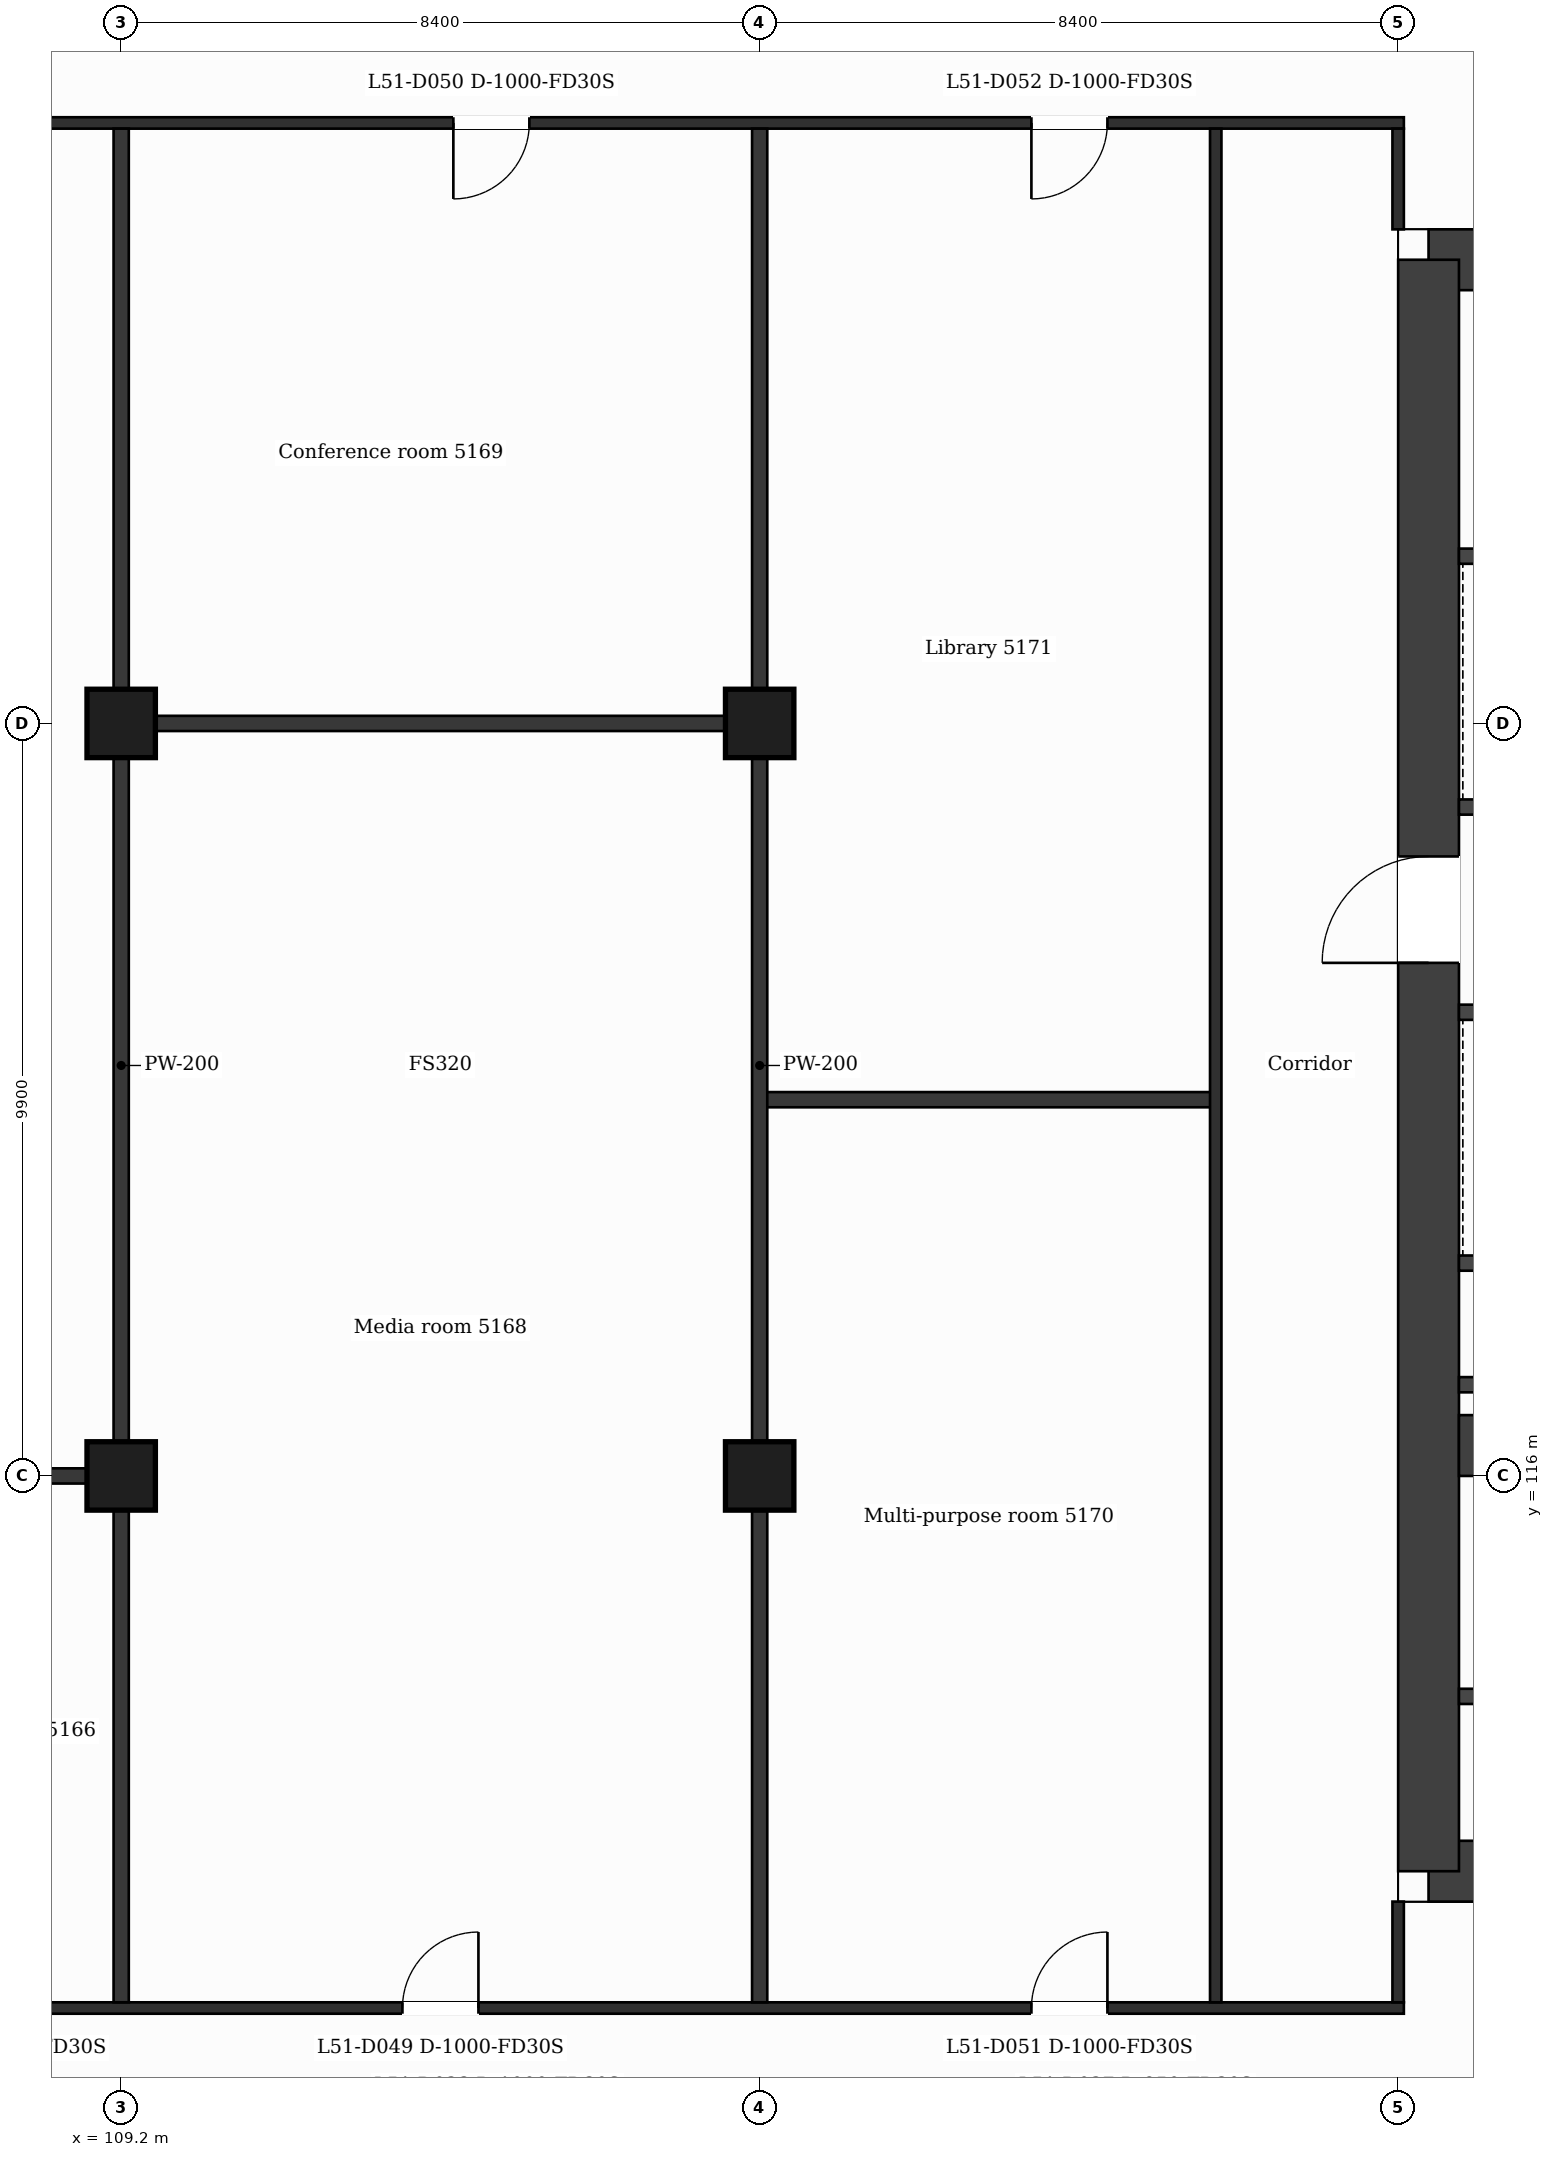
"""IFC4 building model, lengths in metres.
Left out: names, types, materials, properties, quantities, classifications, styles, units other than length and angle.
Written with IfcOpenShell. Run it as: python <this file> out.ifc"""

import sys

from ifc_helpers import new_model, si_unit, direction, frame, frame_2d, origin, origin_2d, place, context, subcontext, project, spatial, rectangle, extrude, element, fill, save


model = new_model("IFC4")
c1 = context("Model", 3, precision=1e-05, world=origin(), true_north=direction((0.0, 1.0)))
c2 = subcontext(c1, "Body", "Model", "MODEL_VIEW")
j1 = project(units=[si_unit("LENGTHUNIT", "METRE"), si_unit("PLANEANGLEUNIT", "RADIAN")], contexts=[c1])
p1 = place(None, origin())
s1 = spatial("IfcSite", under=j1, at=p1, CompositionType="ELEMENT")
p2 = place(p1, origin())
s2 = spatial("IfcBuilding", under=s1, at=p2, CompositionType="ELEMENT")
p3 = place(p2, frame((0.0, 0.0, 213.3)))
s3 = spatial("IfcBuildingStorey", under=s2, at=p3, CompositionType="ELEMENT", Elevation=213.3)
p4 = place(p3, frame((126.4, 132.0, 0.0), z_axis=(0.0, 0.0, 1.0), x_axis=(1.0, 0.0, 0.0)))
e1 = element("IfcWall", 1, at=p4, inside=s3, PredefinedType="SHEAR", context=c2, shape_type="SweptSolid", body=[
    extrude(rectangle(XDim=11.42, YDim=0.8, at=frame_2d((5.71, 0.0))), origin(), (0.0, 0.0, 1.0), 3.7),
])
p5 = place(p4, frame((3.386, 0.0, 0.0)))
e2 = element("IfcOpeningElement", 2, at=p5, cuts=e1, PredefinedType="OPENING", context=c2, shape_type="SweptSolid", body=[
    extrude(rectangle(XDim=1.2, YDim=2.1, at=frame_2d((0.6, 1.05))), frame((0.0, 0.41, 0.0), z_axis=(0.0, -1.0, 0.0), x_axis=(1.0, 0.0, 0.0)), (0.0, 0.0, 1.0), 0.82),
])
p6 = place(p3, frame((140.673, 110.8, 0.0), z_axis=(0.0, 0.0, 1.0), x_axis=(-1.0, 0.0, 0.0)))
e3 = element("IfcWall", 3, at=p6, inside=s3, PredefinedType="SHEAR", context=c2, shape_type="SweptSolid", body=[
    extrude(rectangle(XDim=14.273, YDim=0.8, at=frame_2d((7.137, 0.0))), origin(), (0.0, 0.0, 1.0), 3.7),
])
p7 = place(p6, frame((6.965, 0.0, 0.0)))
e4 = element("IfcOpeningElement", 4, at=p7, cuts=e3, PredefinedType="OPENING", context=c2, shape_type="SweptSolid", body=[
    extrude(rectangle(XDim=1.4, YDim=2.1, at=frame_2d((0.7, 1.05))), frame((0.0, 0.41, 0.0), z_axis=(0.0, -1.0, 0.0), x_axis=(1.0, 0.0, 0.0)), (0.0, 0.0, 1.0), 0.82),
])
p8 = place(p3, frame((126.4, 110.8, 0.0), z_axis=(0.0, 0.0, 1.0), x_axis=(0.0, 1.0, 0.0)))
e5 = element("IfcWall", 5, at=p8, inside=s3, PredefinedType="SHEAR", context=c2, shape_type="SweptSolid", body=[
    extrude(rectangle(XDim=21.2, YDim=0.8, at=frame_2d((10.6, 0.0))), origin(), (0.0, 0.0, 1.0), 3.7),
])
p9 = place(p8, frame((11.95, 0.0, 0.0)))
e6 = element("IfcOpeningElement", 6, at=p9, cuts=e5, PredefinedType="OPENING", context=c2, shape_type="SweptSolid", body=[
    extrude(rectangle(XDim=1.4, YDim=2.1, at=frame_2d((0.7, 1.05))), frame((0.0, 0.41, 0.0), z_axis=(0.0, -1.0, 0.0), x_axis=(1.0, 0.0, 0.0)), (0.0, 0.0, 1.0), 0.82),
])
p10 = place(p3, frame((126.8, 116.4, 0.0), z_axis=(0.0, 0.0, 1.0), x_axis=(1.0, 0.0, 0.0)))
e7 = element("IfcWall", 7, at=p10, inside=s3, PredefinedType="SHEAR", context=c2, shape_type="SweptSolid", body=[
    extrude(rectangle(XDim=5.3, YDim=0.8, at=frame_2d((2.65, 0.0))), origin(), (0.0, 0.0, 1.0), 3.7),
])
for number, where, z_axis, x_axis in (
    (8, (109.2, 116.0, 0.0), (0.0, 0.0, 1.0), (1.0, 0.0, 0.0)),
    (9, (117.6, 116.0, 0.0), (0.0, 0.0, 1.0), (1.0, 0.0, 0.0)),
    (10, (109.2, 125.9, 0.0), (0.0, 0.0, 1.0), (1.0, 0.0, 0.0)),
    (11, (117.6, 125.9, 0.0), (0.0, 0.0, 1.0), (1.0, 0.0, 0.0)),
):
    element("IfcColumn", number, at=place(p3, frame(where, z_axis=z_axis, x_axis=x_axis)), inside=s3, PredefinedType="COLUMN", context=c2, shape_type="SweptSolid", body=[
        extrude(rectangle(XDim=0.9, YDim=0.9, at=origin_2d()), origin(), (0.0, 0.0, 1.0), 3.7),
    ])
p11 = place(p3, frame((100.725, 109.0, 0.0), z_axis=(0.0, 0.0, 1.0), x_axis=(1.0, 0.0, 0.0)))
e12 = element("IfcWall", 12, at=p11, inside=s3, PredefinedType="PARTITIONING", context=c2, shape_type="SweptSolid", body=[
    extrude(rectangle(XDim=25.35, YDim=0.15, at=frame_2d((12.675, 0.0))), origin(), (0.0, 0.0, 1.0), 3.38),
])
p12 = place(p11, frame((6.15, 0.0, 0.0)))
e13 = element("IfcOpeningElement", 13, at=p12, cuts=e12, PredefinedType="OPENING", context=c2, shape_type="SweptSolid", body=[
    extrude(rectangle(XDim=1.0, YDim=2.1, at=frame_2d((0.5, 1.05))), frame((0.0, 0.085, 0.0), z_axis=(0.0, -1.0, 0.0), x_axis=(1.0, 0.0, 0.0)), (0.0, 0.0, 1.0), 0.17),
])
p13 = place(p11, frame((3.475, 0.0, 0.0)))
e14 = element("IfcOpeningElement", 14, at=p13, cuts=e12, PredefinedType="OPENING", context=c2, shape_type="SweptSolid", body=[
    extrude(rectangle(XDim=1.0, YDim=2.1, at=frame_2d((0.5, 1.05))), frame((0.0, 0.085, 0.0), z_axis=(0.0, -1.0, 0.0), x_axis=(1.0, 0.0, 0.0)), (0.0, 0.0, 1.0), 0.17),
])
p14 = place(p11, frame((12.175, 0.0, 0.0)))
e15 = element("IfcOpeningElement", 15, at=p14, cuts=e12, PredefinedType="OPENING", context=c2, shape_type="SweptSolid", body=[
    extrude(rectangle(XDim=1.0, YDim=2.1, at=frame_2d((0.5, 1.05))), frame((0.0, 0.085, 0.0), z_axis=(0.0, -1.0, 0.0), x_axis=(1.0, 0.0, 0.0)), (0.0, 0.0, 1.0), 0.17),
])
p15 = place(p11, frame((20.45, 0.0, 0.0)))
e16 = element("IfcOpeningElement", 16, at=p15, cuts=e12, PredefinedType="OPENING", context=c2, shape_type="SweptSolid", body=[
    extrude(rectangle(XDim=1.0, YDim=2.1, at=frame_2d((0.5, 1.05))), frame((0.0, 0.085, 0.0), z_axis=(0.0, -1.0, 0.0), x_axis=(1.0, 0.0, 0.0)), (0.0, 0.0, 1.0), 0.17),
])
p16 = place(p3, frame((126.8, 113.1, 0.0), z_axis=(0.0, 0.0, 1.0), x_axis=(1.0, 0.0, 0.0)))
e17 = element("IfcWall", 17, at=p16, inside=s3, PredefinedType="PARTITIONING", context=c2, shape_type="SweptSolid", body=[
    extrude(rectangle(XDim=4.873, YDim=0.2, at=frame_2d((2.437, 0.0))), origin(), (0.0, 0.0, 1.0), 3.38),
])
p17 = place(p16, frame((1.936, 0.0, 0.0)))
e18 = element("IfcOpeningElement", 18, at=p17, cuts=e17, PredefinedType="OPENING", context=c2, shape_type="SweptSolid", body=[
    extrude(rectangle(XDim=0.9, YDim=2.1, at=frame_2d((0.45, 1.05))), frame((0.0, 0.11, 0.0), z_axis=(0.0, -1.0, 0.0), x_axis=(1.0, 0.0, 0.0)), (0.0, 0.0, 1.0), 0.22),
])
p18 = place(p3, frame((103.2, 116.0, 0.0), z_axis=(0.0, 0.0, 1.0), x_axis=(1.0, 0.0, 0.0)))
e19 = element("IfcWall", 19, at=p18, inside=s3, PredefinedType="PARTITIONING", context=c2, shape_type="SweptSolid", body=[
    extrude(rectangle(XDim=6.0, YDim=0.2, at=frame_2d((3.0, 0.0))), origin(), (0.0, 0.0, 1.0), 3.38),
])
for number, where, z_axis, x_axis in (
    (20, (126.8, 117.2, 0.0), (0.0, 0.0, 1.0), (1.0, 0.0, 0.0)),
    (21, (126.8, 118.8, 0.0), (0.0, 0.0, 1.0), (1.0, 0.0, 0.0)),
):
    element("IfcWall", number, at=place(p3, frame(where, z_axis=z_axis, x_axis=x_axis)), inside=s3, PredefinedType="PARTITIONING", context=c2, shape_type="SweptSolid", body=[
        extrude(rectangle(XDim=4.773, YDim=0.2, at=frame_2d((2.386, 0.0))), origin(), (0.0, 0.0, 1.0), 3.38),
    ])
p19 = place(p3, frame((117.6, 120.95, 0.0), z_axis=(0.0, 0.0, 1.0), x_axis=(1.0, 0.0, 0.0)))
e22 = element("IfcWall", 22, at=p19, inside=s3, PredefinedType="PARTITIONING", context=c2, shape_type="SweptSolid", body=[
    extrude(rectangle(XDim=6.0, YDim=0.2, at=frame_2d((3.0, 0.0))), origin(), (0.0, 0.0, 1.0), 3.38),
])
p20 = place(p3, frame((126.8, 122.1, 0.0), z_axis=(0.0, 0.0, 1.0), x_axis=(1.0, 0.0, 0.0)))
e23 = element("IfcWall", 23, at=p20, inside=s3, PredefinedType="PARTITIONING", context=c2, shape_type="SweptSolid", body=[
    extrude(rectangle(XDim=4.773, YDim=0.2, at=frame_2d((2.386, 0.0))), origin(), (0.0, 0.0, 1.0), 3.38),
])
p21 = place(p20, frame((3.176, 0.0, 0.0)))
e24 = element("IfcOpeningElement", 24, at=p21, cuts=e23, PredefinedType="OPENING", context=c2, shape_type="SweptSolid", body=[
    extrude(rectangle(XDim=1.1, YDim=2.1, at=frame_2d((0.55, 1.05))), frame((0.0, 0.11, 0.0), z_axis=(0.0, -1.0, 0.0), x_axis=(1.0, 0.0, 0.0)), (0.0, 0.0, 1.0), 0.22),
])
p22 = place(p20, frame((0.79, 0.0, 0.0)))
e25 = element("IfcOpeningElement", 25, at=p22, cuts=e23, PredefinedType="OPENING", context=c2, shape_type="SweptSolid", body=[
    extrude(rectangle(XDim=1.1, YDim=2.1, at=frame_2d((0.55, 1.05))), frame((0.0, 0.11, 0.0), z_axis=(0.0, -1.0, 0.0), x_axis=(1.0, 0.0, 0.0)), (0.0, 0.0, 1.0), 0.22),
])
p23 = place(p3, frame((126.8, 124.8, 0.0), z_axis=(0.0, 0.0, 1.0), x_axis=(1.0, 0.0, 0.0)))
e26 = element("IfcWall", 26, at=p23, inside=s3, PredefinedType="PARTITIONING", context=c2, shape_type="SweptSolid", body=[
    extrude(rectangle(XDim=4.782, YDim=0.2, at=frame_2d((2.391, 0.0))), origin(), (0.0, 0.0, 1.0), 3.38),
])
p24 = place(p23, frame((0.498, 0.0, 0.0)))
e27 = element("IfcOpeningElement", 27, at=p24, cuts=e26, PredefinedType="OPENING", context=c2, shape_type="SweptSolid", body=[
    extrude(rectangle(XDim=1.1, YDim=2.1, at=frame_2d((0.55, 1.05))), frame((0.0, 0.11, 0.0), z_axis=(0.0, -1.0, 0.0), x_axis=(1.0, 0.0, 0.0)), (0.0, 0.0, 1.0), 0.22),
])
p25 = place(p3, frame((109.2, 125.9, 0.0), z_axis=(0.0, 0.0, 1.0), x_axis=(1.0, 0.0, 0.0)))
e28 = element("IfcWall", 28, at=p25, inside=s3, PredefinedType="PARTITIONING", context=c2, shape_type="SweptSolid", body=[
    extrude(rectangle(XDim=8.4, YDim=0.2, at=frame_2d((4.2, 0.0))), origin(), (0.0, 0.0, 1.0), 3.38),
])
p26 = place(p3, frame((126.8, 128.1, 0.0), z_axis=(0.0, 0.0, 1.0), x_axis=(1.0, 0.0, 0.0)))
e29 = element("IfcWall", 29, at=p26, inside=s3, PredefinedType="PARTITIONING", context=c2, shape_type="SweptSolid", body=[
    extrude(rectangle(XDim=4.782, YDim=0.2, at=frame_2d((2.391, 0.0))), origin(), (0.0, 0.0, 1.0), 3.38),
])
p27 = place(p26, frame((3.036, 0.0, 0.0)))
e30 = element("IfcOpeningElement", 30, at=p27, cuts=e29, PredefinedType="OPENING", context=c2, shape_type="SweptSolid", body=[
    extrude(rectangle(XDim=1.1, YDim=2.1, at=frame_2d((0.55, 1.05))), frame((0.0, 0.11, 0.0), z_axis=(0.0, -1.0, 0.0), x_axis=(1.0, 0.0, 0.0)), (0.0, 0.0, 1.0), 0.22),
])
p28 = place(p3, frame((100.725, 133.8, 0.0), z_axis=(0.0, 0.0, 1.0), x_axis=(1.0, 0.0, 0.0)))
e31 = element("IfcWall", 31, at=p28, inside=s3, PredefinedType="PARTITIONING", context=c2, shape_type="SweptSolid", body=[
    extrude(rectangle(XDim=25.35, YDim=0.15, at=frame_2d((12.675, 0.0))), origin(), (0.0, 0.0, 1.0), 3.38),
])
p29 = place(p28, frame((4.545, 0.0, 0.0)))
e32 = element("IfcOpeningElement", 32, at=p29, cuts=e31, PredefinedType="OPENING", context=c2, shape_type="SweptSolid", body=[
    extrude(rectangle(XDim=1.0, YDim=2.1, at=frame_2d((0.5, 1.05))), frame((0.0, 0.085, 0.0), z_axis=(0.0, -1.0, 0.0), x_axis=(1.0, 0.0, 0.0)), (0.0, 0.0, 1.0), 0.17),
])
p30 = place(p28, frame((12.845, 0.0, 0.0)))
e33 = element("IfcOpeningElement", 33, at=p30, cuts=e31, PredefinedType="OPENING", context=c2, shape_type="SweptSolid", body=[
    extrude(rectangle(XDim=1.0, YDim=2.1, at=frame_2d((0.5, 1.05))), frame((0.0, 0.085, 0.0), z_axis=(0.0, -1.0, 0.0), x_axis=(1.0, 0.0, 0.0)), (0.0, 0.0, 1.0), 0.17),
])
p31 = place(p28, frame((20.45, 0.0, 0.0)))
e34 = element("IfcOpeningElement", 34, at=p31, cuts=e31, PredefinedType="OPENING", context=c2, shape_type="SweptSolid", body=[
    extrude(rectangle(XDim=1.0, YDim=2.1, at=frame_2d((0.5, 1.05))), frame((0.0, 0.085, 0.0), z_axis=(0.0, -1.0, 0.0), x_axis=(1.0, 0.0, 0.0)), (0.0, 0.0, 1.0), 0.17),
])
for number, where, z_axis, x_axis in (
    (35, (109.2, 109.075, 0.0), (0.0, 0.0, 1.0), (0.0, 1.0, 0.0)),
    (36, (117.6, 109.075, 0.0), (0.0, 0.0, 1.0), (0.0, 1.0, 0.0)),
):
    element("IfcWall", number, at=place(p3, frame(where, z_axis=z_axis, x_axis=x_axis)), inside=s3, PredefinedType="PARTITIONING", context=c2, shape_type="SweptSolid", body=[
        extrude(rectangle(XDim=24.65, YDim=0.2, at=frame_2d((12.325, 0.0))), origin(), (0.0, 0.0, 1.0), 3.38),
    ])
p32 = place(p3, frame((123.6, 109.075, 0.0), z_axis=(0.0, 0.0, 1.0), x_axis=(0.0, 1.0, 0.0)))
e37 = element("IfcWall", 37, at=p32, inside=s3, PredefinedType="PARTITIONING", context=c2, shape_type="SweptSolid", body=[
    extrude(rectangle(XDim=24.65, YDim=0.15, at=frame_2d((12.325, 0.0))), origin(), (0.0, 0.0, 1.0), 3.38),
])
p33 = place(p3, frame((126.0, 109.075, 0.0), z_axis=(0.0, 0.0, 1.0), x_axis=(0.0, 1.0, 0.0)))
e38 = element("IfcWall", 38, at=p33, inside=s3, PredefinedType="PARTITIONING", context=c2, shape_type="SweptSolid", body=[
    extrude(rectangle(XDim=1.325, YDim=0.15, at=frame_2d((0.663, 0.0))), origin(), (0.0, 0.0, 1.0), 3.38),
])
p34 = place(p3, frame((126.0, 132.4, 0.0), z_axis=(0.0, 0.0, 1.0), x_axis=(0.0, 1.0, 0.0)))
e39 = element("IfcWall", 39, at=p34, inside=s3, PredefinedType="PARTITIONING", context=c2, shape_type="SweptSolid", body=[
    extrude(rectangle(XDim=1.325, YDim=0.15, at=frame_2d((0.663, 0.0))), origin(), (0.0, 0.0, 1.0), 3.38),
])
p35 = place(p14, origin())
e40 = element("IfcDoor", 40, at=p35, inside=s3, OperationType="SINGLE_SWING_RIGHT", PredefinedType="DOOR", context=c2, shape_type="SweptSolid", body=[
    extrude(rectangle(XDim=1.0, YDim=2.1, at=frame_2d((0.5, 1.05))), frame((0.0, 0.025, 0.0), z_axis=(0.0, -1.0, 0.0), x_axis=(1.0, 0.0, 0.0)), (0.0, 0.0, 1.0), 0.05),
])
fill(e15, e40)
p36 = place(p30, origin())
e41 = element("IfcDoor", 41, at=p36, inside=s3, OperationType="SINGLE_SWING_LEFT", PredefinedType="DOOR", context=c2, shape_type="SweptSolid", body=[
    extrude(rectangle(XDim=1.0, YDim=2.1, at=frame_2d((0.5, 1.05))), frame((0.0, 0.025, 0.0), z_axis=(0.0, -1.0, 0.0), x_axis=(1.0, 0.0, 0.0)), (0.0, 0.0, 1.0), 0.05),
])
fill(e33, e41)
p37 = place(p15, origin())
e42 = element("IfcDoor", 42, at=p37, inside=s3, OperationType="SINGLE_SWING_RIGHT", PredefinedType="DOOR", context=c2, shape_type="SweptSolid", body=[
    extrude(rectangle(XDim=1.0, YDim=2.1, at=frame_2d((0.5, 1.05))), frame((0.0, 0.025, 0.0), z_axis=(0.0, -1.0, 0.0), x_axis=(1.0, 0.0, 0.0)), (0.0, 0.0, 1.0), 0.05),
])
fill(e16, e42)
p38 = place(p31, origin())
e43 = element("IfcDoor", 43, at=p38, inside=s3, OperationType="SINGLE_SWING_LEFT", PredefinedType="DOOR", context=c2, shape_type="SweptSolid", body=[
    extrude(rectangle(XDim=1.0, YDim=2.1, at=frame_2d((0.5, 1.05))), frame((0.0, 0.025, 0.0), z_axis=(0.0, -1.0, 0.0), x_axis=(1.0, 0.0, 0.0)), (0.0, 0.0, 1.0), 0.05),
])
fill(e34, e43)
p39 = place(p9, origin())
e44 = element("IfcDoor", 44, at=p39, inside=s3, OperationType="SINGLE_SWING_LEFT", PredefinedType="DOOR", context=c2, shape_type="SweptSolid", body=[
    extrude(rectangle(XDim=1.4, YDim=2.1, at=frame_2d((0.7, 1.05))), frame((0.0, 0.025, 0.0), z_axis=(0.0, -1.0, 0.0), x_axis=(1.0, 0.0, 0.0)), (0.0, 0.0, 1.0), 0.05),
])
fill(e6, e44)
save(model, sys.argv[1])
